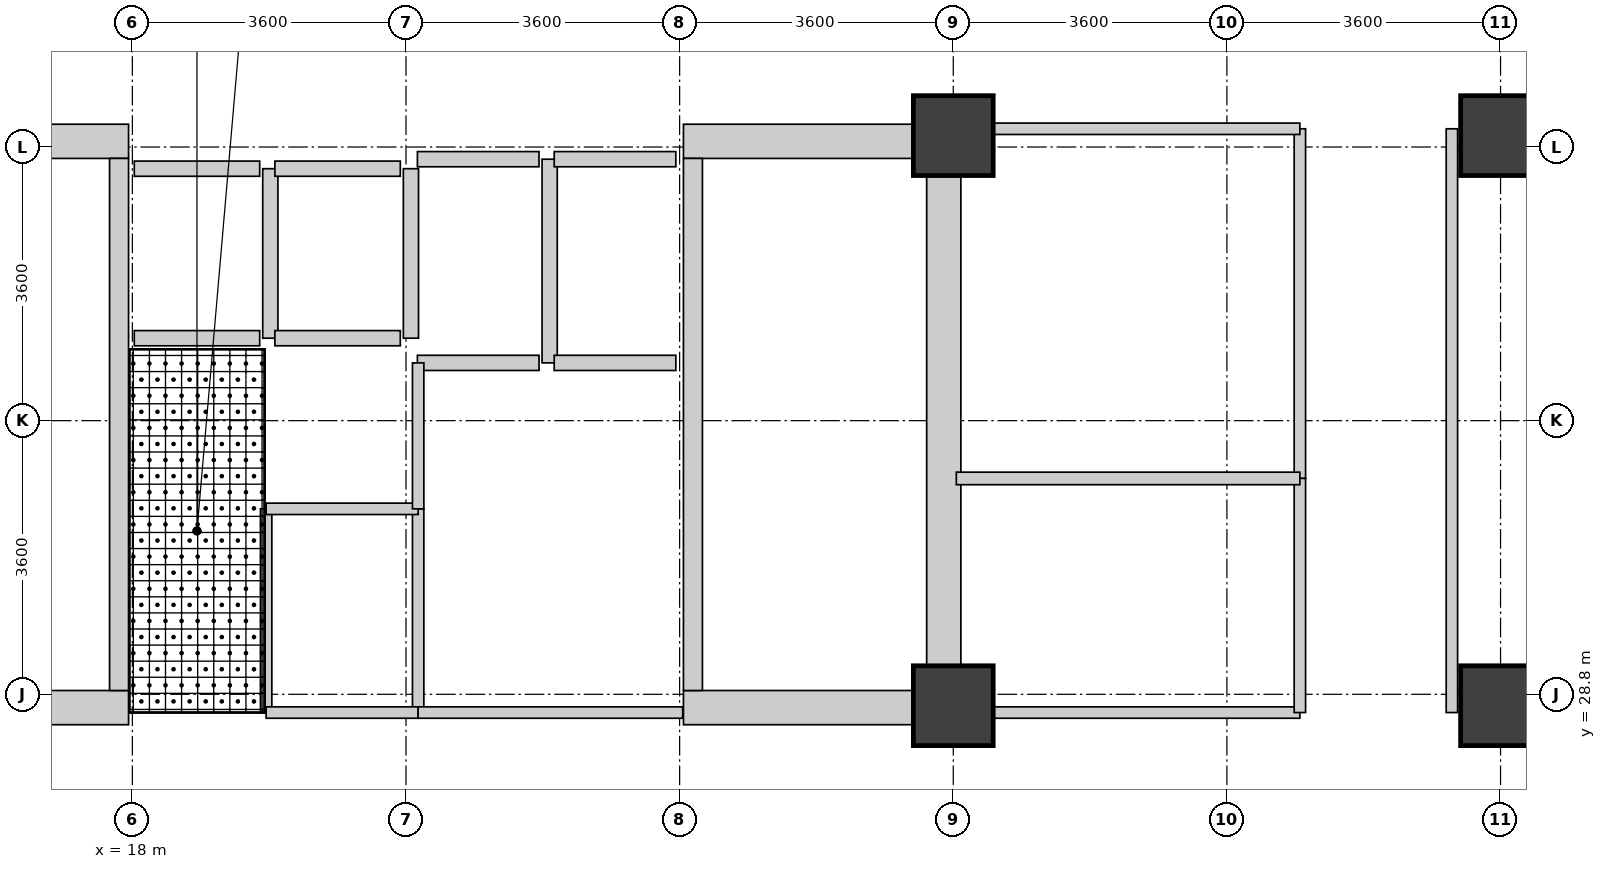
"""IFC4 building model, lengths in metres.
Left out: names, types, materials, properties, quantities, classifications, styles, units other than length and angle.
Written with IfcOpenShell. Run it as: python <this file> out.ifc"""

import sys

from ifc_helpers import new_model, si_unit, direction, frame, frame_2d, origin, origin_2d, place, context, subcontext, project, spatial, rectangle, extrude, source, transform, mapped, element, fill, save


model = new_model("IFC4")
c1 = context("Model", 3, precision=1e-05, world=origin(), true_north=direction((0.0, 1.0)))
c2 = subcontext(c1, "Body", "Model", "MODEL_VIEW")
j1 = project(units=[si_unit("LENGTHUNIT", "METRE"), si_unit("PLANEANGLEUNIT", "RADIAN")], contexts=[c1])
p1 = place(None, origin())
s1 = spatial("IfcSite", under=j1, at=p1, CompositionType="ELEMENT")
p2 = place(p1, origin())
s2 = spatial("IfcBuilding", under=s1, at=p2, CompositionType="ELEMENT")
p3 = place(p2, frame((0.0, 0.0, 135.6)))
s3 = spatial("IfcBuildingStorey", under=s2, at=p3, CompositionType="ELEMENT", Elevation=135.6)
p4 = place(p3, frame((28.675, 28.4, 0.0), z_axis=(0.0, 0.0, 1.0), x_axis=(0.0, 1.0, 0.0)))
e1 = element("IfcWall", 1, at=p4, inside=s3, PredefinedType="SHEAR", context=c2, shape_type="SweptSolid", body=[
    extrude(rectangle(XDim=7.9, YDim=0.45, at=frame_2d((3.95, 0.0))), origin(), (0.0, 0.0, 1.0), 4.36),
])
for number, where, z_axis, x_axis in (
    (2, (14.75, 28.625, 0.0), (0.0, 0.0, 1.0), (1.0, 0.0, 0.0)),
    (3, (25.25, 28.625, 0.0), (0.0, 0.0, 1.0), (1.0, 0.0, 0.0)),
    (4, (14.75, 36.075, 0.0), (0.0, 0.0, 1.0), (1.0, 0.0, 0.0)),
    (5, (25.25, 36.075, 0.0), (0.0, 0.0, 1.0), (1.0, 0.0, 0.0)),
):
    element("IfcWall", number, at=place(p3, frame(where, z_axis=z_axis, x_axis=x_axis)), inside=s3, PredefinedType="SHEAR", context=c2, shape_type="SweptSolid", body=[
        extrude(rectangle(XDim=3.2, YDim=0.45, at=frame_2d((1.6, 0.0))), origin(), (0.0, 0.0, 1.0), 4.36),
    ])
p5 = place(p3, frame((17.825, 28.85, 0.0), z_axis=(0.0, 0.0, 1.0), x_axis=(0.0, 1.0, 0.0)))
e6 = element("IfcWall", 6, at=p5, inside=s3, PredefinedType="SHEAR", context=c2, shape_type="SweptSolid", body=[
    extrude(rectangle(XDim=7.0, YDim=0.25, at=frame_2d((3.5, 0.0))), origin(), (0.0, 0.0, 1.0), 4.36),
])
p6 = place(p5, frame((0.15, 0.0, 0.0)))
e7 = element("IfcOpeningElement", 7, at=p6, cuts=e6, PredefinedType="OPENING", context=c2, shape_type="SweptSolid", body=[
    extrude(rectangle(XDim=1.1, YDim=2.08, at=frame_2d((0.55, 1.04))), frame((0.0, 0.135, 0.0), z_axis=(0.0, -1.0, 0.0), x_axis=(1.0, 0.0, 0.0)), (0.0, 0.0, 1.0), 0.27),
])
p7 = place(p3, frame((25.375, 28.85, 0.0), z_axis=(0.0, 0.0, 1.0), x_axis=(0.0, 1.0, 0.0)))
e8 = element("IfcWall", 8, at=p7, inside=s3, PredefinedType="SHEAR", context=c2, shape_type="SweptSolid", body=[
    extrude(rectangle(XDim=7.0, YDim=0.25, at=frame_2d((3.5, 0.0))), origin(), (0.0, 0.0, 1.0), 4.36),
])
p8 = place(p7, frame((0.15, 0.0, 0.0)))
e9 = element("IfcOpeningElement", 9, at=p8, cuts=e8, PredefinedType="OPENING", context=c2, shape_type="SweptSolid", body=[
    extrude(rectangle(XDim=1.1, YDim=2.08, at=frame_2d((0.55, 1.04))), frame((0.0, 0.135, 0.0), z_axis=(0.0, -1.0, 0.0), x_axis=(1.0, 0.0, 0.0)), (0.0, 0.0, 1.0), 0.27),
])
m1 = source(origin(), c2, "Body", "SweptSolid", [
    extrude(rectangle(XDim=1.05, YDim=1.05, at=origin_2d()), origin(), (0.0, 0.0, 1.0), 4.6),
])
for number, where, z_axis, x_axis in (
    (10, (28.8, 28.65, 0.0), (0.0, 0.0, 1.0), (1.0, 0.0, 0.0)),
    (11, (28.8, 36.15, 0.0), (0.0, 0.0, 1.0), (1.0, 0.0, 0.0)),
    (12, (36.0, 28.65, 0.0), (0.0, 0.0, 1.0), (1.0, 0.0, 0.0)),
    (13, (36.0, 36.15, 0.0), (0.0, 0.0, 1.0), (1.0, 0.0, 0.0)),
):
    element("IfcColumn", number, at=place(p3, frame(where, z_axis=z_axis, x_axis=x_axis)), inside=s3, PredefinedType="COLUMN", context=c2, shape_type="MappedRepresentation", body=[
        mapped(m1, transform((0.0, 0.0, 0.0), x_axis=(1.0, 0.0, 0.0), y_axis=(0.0, 1.0, 0.0), z_axis=(0.0, 0.0, 1.0), scale=1.0)),
    ])
p9 = place(p3, frame((18.025, 33.485, 0.0), z_axis=(0.0, 0.0, 1.0), x_axis=(1.0, 0.0, 0.0)))
e14 = element("IfcWall", 14, at=p9, inside=s3, PredefinedType="PARTITIONING", context=c2, shape_type="SweptSolid", body=[
    extrude(rectangle(XDim=1.65, YDim=0.2, at=frame_2d((0.825, 0.0))), origin(), (0.0, 0.0, 1.0), 4.34),
])
p10 = place(p9, frame((0.275, 0.0, 0.0)))
e15 = element("IfcOpeningElement", 15, at=p10, cuts=e14, PredefinedType="OPENING", context=c2, shape_type="SweptSolid", body=[
    extrude(rectangle(XDim=1.1, YDim=2.12, at=frame_2d((0.55, 1.06))), frame((0.0, 0.11, 0.0), z_axis=(0.0, -1.0, 0.0), x_axis=(1.0, 0.0, 0.0)), (0.0, 0.0, 1.0), 0.22),
])
p11 = place(p3, frame((18.025, 35.715, 0.0), z_axis=(0.0, 0.0, 1.0), x_axis=(1.0, 0.0, 0.0)))
e16 = element("IfcWall", 16, at=p11, inside=s3, PredefinedType="PARTITIONING", context=c2, shape_type="SweptSolid", body=[
    extrude(rectangle(XDim=1.65, YDim=0.2, at=frame_2d((0.825, 0.0))), origin(), (0.0, 0.0, 1.0), 3.34),
])
p12 = place(p3, frame((19.815, 33.485, 0.0), z_axis=(0.0, 0.0, 1.0), x_axis=(0.0, 1.0, 0.0)))
e17 = element("IfcWall", 17, at=p12, inside=s3, PredefinedType="PARTITIONING", context=c2, shape_type="SweptSolid", body=[
    extrude(rectangle(XDim=2.23, YDim=0.2, at=frame_2d((1.115, 0.0))), origin(), (0.0, 0.0, 1.0), 4.34),
])
p13 = place(p3, frame((19.875, 33.485, 0.0), z_axis=(0.0, 0.0, 1.0), x_axis=(1.0, 0.0, 0.0)))
e18 = element("IfcWall", 18, at=p13, inside=s3, PredefinedType="PARTITIONING", context=c2, shape_type="SweptSolid", body=[
    extrude(rectangle(XDim=1.65, YDim=0.2, at=frame_2d((0.825, 0.0))), origin(), (0.0, 0.0, 1.0), 4.34),
])
p14 = place(p13, frame((0.275, 0.0, 0.0)))
e19 = element("IfcOpeningElement", 19, at=p14, cuts=e18, PredefinedType="OPENING", context=c2, shape_type="SweptSolid", body=[
    extrude(rectangle(XDim=1.1, YDim=2.12, at=frame_2d((0.55, 1.06))), frame((0.0, 0.11, 0.0), z_axis=(0.0, -1.0, 0.0), x_axis=(1.0, 0.0, 0.0)), (0.0, 0.0, 1.0), 0.22),
])
p15 = place(p3, frame((19.875, 35.715, 0.0), z_axis=(0.0, 0.0, 1.0), x_axis=(1.0, 0.0, 0.0)))
e20 = element("IfcWall", 20, at=p15, inside=s3, PredefinedType="PARTITIONING", context=c2, shape_type="SweptSolid", body=[
    extrude(rectangle(XDim=1.65, YDim=0.2, at=frame_2d((0.825, 0.0))), origin(), (0.0, 0.0, 1.0), 3.34),
])
p16 = place(p3, frame((21.665, 33.485, 0.0), z_axis=(0.0, 0.0, 1.0), x_axis=(0.0, 1.0, 0.0)))
e21 = element("IfcWall", 21, at=p16, inside=s3, PredefinedType="PARTITIONING", context=c2, shape_type="SweptSolid", body=[
    extrude(rectangle(XDim=2.23, YDim=0.2, at=frame_2d((1.115, 0.0))), origin(), (0.0, 0.0, 1.0), 4.34),
])
p17 = place(p3, frame((21.75, 33.16, 0.0), z_axis=(0.0, 0.0, 1.0), x_axis=(1.0, 0.0, 0.0)))
e22 = element("IfcWall", 22, at=p17, inside=s3, PredefinedType="PARTITIONING", context=c2, shape_type="SweptSolid", body=[
    extrude(rectangle(XDim=1.6, YDim=0.2, at=frame_2d((0.8, 0.0))), origin(), (0.0, 0.0, 1.0), 4.34),
])
p18 = place(p17, frame((0.2, 0.0, 0.0)))
e23 = element("IfcOpeningElement", 23, at=p18, cuts=e22, PredefinedType="OPENING", context=c2, shape_type="SweptSolid", body=[
    extrude(rectangle(XDim=1.2, YDim=2.12, at=frame_2d((0.6, 1.06))), frame((0.0, 0.11, 0.0), z_axis=(0.0, -1.0, 0.0), x_axis=(1.0, 0.0, 0.0)), (0.0, 0.0, 1.0), 0.22),
])
p19 = place(p3, frame((21.75, 35.84, 0.0), z_axis=(0.0, 0.0, 1.0), x_axis=(1.0, 0.0, 0.0)))
e24 = element("IfcWall", 24, at=p19, inside=s3, PredefinedType="PARTITIONING", context=c2, shape_type="SweptSolid", body=[
    extrude(rectangle(XDim=1.6, YDim=0.2, at=frame_2d((0.8, 0.0))), origin(), (0.0, 0.0, 1.0), 3.34),
])
p20 = place(p3, frame((23.49, 33.16, 0.0), z_axis=(0.0, 0.0, 1.0), x_axis=(0.0, 1.0, 0.0)))
e25 = element("IfcWall", 25, at=p20, inside=s3, PredefinedType="PARTITIONING", context=c2, shape_type="SweptSolid", body=[
    extrude(rectangle(XDim=2.68, YDim=0.2, at=frame_2d((1.34, 0.0))), origin(), (0.0, 0.0, 1.0), 4.34),
])
p21 = place(p3, frame((23.55, 33.16, 0.0), z_axis=(0.0, 0.0, 1.0), x_axis=(1.0, 0.0, 0.0)))
e26 = element("IfcWall", 26, at=p21, inside=s3, PredefinedType="PARTITIONING", context=c2, shape_type="SweptSolid", body=[
    extrude(rectangle(XDim=1.6, YDim=0.2, at=frame_2d((0.8, 0.0))), origin(), (0.0, 0.0, 1.0), 4.34),
])
p22 = place(p21, frame((0.2, 0.0, 0.0)))
e27 = element("IfcOpeningElement", 27, at=p22, cuts=e26, PredefinedType="OPENING", context=c2, shape_type="SweptSolid", body=[
    extrude(rectangle(XDim=1.2, YDim=2.12, at=frame_2d((0.6, 1.06))), frame((0.0, 0.11, 0.0), z_axis=(0.0, -1.0, 0.0), x_axis=(1.0, 0.0, 0.0)), (0.0, 0.0, 1.0), 0.22),
])
p23 = place(p3, frame((23.55, 35.84, 0.0), z_axis=(0.0, 0.0, 1.0), x_axis=(1.0, 0.0, 0.0)))
e28 = element("IfcWall", 28, at=p23, inside=s3, PredefinedType="PARTITIONING", context=c2, shape_type="SweptSolid", body=[
    extrude(rectangle(XDim=1.6, YDim=0.2, at=frame_2d((0.8, 0.0))), origin(), (0.0, 0.0, 1.0), 3.34),
])
p24 = place(p3, frame((35.36, 28.56, 0.0), z_axis=(0.0, 0.0, 1.0), x_axis=(0.0, 1.0, 0.0)))
e29 = element("IfcWall", 29, at=p24, inside=s3, PredefinedType="PARTITIONING", context=c2, shape_type="SweptSolid", body=[
    extrude(rectangle(XDim=7.68, YDim=0.15, at=frame_2d((3.84, 0.0))), origin(), (0.0, 0.0, 1.0), 4.34),
])
p25 = place(p24, frame((3.19, 0.0, 0.0)))
e30 = element("IfcOpeningElement", 30, at=p25, cuts=e29, PredefinedType="OPENING", context=c2, shape_type="SweptSolid", body=[
    extrude(rectangle(XDim=1.3, YDim=2.12, at=frame_2d((0.65, 1.06))), frame((0.0, 0.085, 0.0), z_axis=(0.0, -1.0, 0.0), x_axis=(1.0, 0.0, 0.0)), (0.0, 0.0, 1.0), 0.17),
])
p26 = place(p3, frame((33.36, 31.64, 0.0), z_axis=(0.0, 0.0, 1.0), x_axis=(0.0, 1.0, 0.0)))
e31 = element("IfcWall", 31, at=p26, inside=s3, PredefinedType="PARTITIONING", context=c2, shape_type="SweptSolid", body=[
    extrude(rectangle(XDim=4.6, YDim=0.15, at=frame_2d((2.3, 0.0))), origin(), (0.0, 0.0, 1.0), 4.34),
])
p27 = place(p26, frame((1.65, 0.0, 0.0)))
e32 = element("IfcOpeningElement", 32, at=p27, cuts=e31, PredefinedType="OPENING", context=c2, shape_type="SweptSolid", body=[
    extrude(rectangle(XDim=1.3, YDim=2.12, at=frame_2d((0.65, 1.06))), frame((0.0, 0.085, 0.0), z_axis=(0.0, -1.0, 0.0), x_axis=(1.0, 0.0, 0.0)), (0.0, 0.0, 1.0), 0.17),
])
p28 = place(p3, frame((29.325, 28.56, 0.0), z_axis=(0.0, 0.0, 1.0), x_axis=(1.0, 0.0, 0.0)))
e33 = element("IfcWall", 33, at=p28, inside=s3, PredefinedType="PARTITIONING", context=c2, shape_type="SweptSolid", body=[
    extrude(rectangle(XDim=4.035, YDim=0.15, at=frame_2d((2.018, 0.0))), origin(), (0.0, 0.0, 1.0), 3.74),
])
p29 = place(p28, frame((1.587, 0.0, 0.0)))
e34 = element("IfcOpeningElement", 34, at=p29, cuts=e33, PredefinedType="OPENING", context=c2, shape_type="SweptSolid", body=[
    extrude(rectangle(XDim=0.86, YDim=2.02, at=frame_2d((0.43, 1.01))), frame((0.0, 0.085, 0.0), z_axis=(0.0, -1.0, 0.0), x_axis=(1.0, 0.0, 0.0)), (0.0, 0.0, 1.0), 0.17),
])
p30 = place(p3, frame((29.325, 36.24, 0.0), z_axis=(0.0, 0.0, 1.0), x_axis=(1.0, 0.0, 0.0)))
e35 = element("IfcWall", 35, at=p30, inside=s3, PredefinedType="PARTITIONING", context=c2, shape_type="SweptSolid", body=[
    extrude(rectangle(XDim=4.035, YDim=0.15, at=frame_2d((2.018, 0.0))), origin(), (0.0, 0.0, 1.0), 3.74),
])
p31 = place(p3, frame((33.36, 28.56, 0.0), z_axis=(0.0, 0.0, 1.0), x_axis=(0.0, 1.0, 0.0)))
e36 = element("IfcWall", 36, at=p31, inside=s3, PredefinedType="PARTITIONING", context=c2, shape_type="SweptSolid", body=[
    extrude(rectangle(XDim=3.08, YDim=0.15, at=frame_2d((1.54, 0.0))), origin(), (0.0, 0.0, 1.0), 4.34),
])
p32 = place(p3, frame((19.76, 28.56, 0.0), z_axis=(0.0, 0.0, 1.0), x_axis=(0.0, 1.0, 0.0)))
e37 = element("IfcWall", 37, at=p32, inside=s3, PredefinedType="PARTITIONING", context=c2, shape_type="SweptSolid", body=[
    extrude(rectangle(XDim=2.68, YDim=0.15, at=frame_2d((1.34, 0.0))), origin(), (0.0, 0.0, 1.0), 4.34),
])
p33 = place(p32, frame((0.91, 0.0, 0.0)))
e38 = element("IfcOpeningElement", 38, at=p33, cuts=e37, PredefinedType="OPENING", context=c2, shape_type="SweptSolid", body=[
    extrude(rectangle(XDim=0.86, YDim=2.02, at=frame_2d((0.43, 1.01))), frame((0.0, 0.085, 0.0), z_axis=(0.0, -1.0, 0.0), x_axis=(1.0, 0.0, 0.0)), (0.0, 0.0, 1.0), 0.17),
])
p34 = place(p3, frame((21.76, 28.56, 0.0), z_axis=(0.0, 0.0, 1.0), x_axis=(0.0, 1.0, 0.0)))
e39 = element("IfcWall", 39, at=p34, inside=s3, PredefinedType="PARTITIONING", context=c2, shape_type="SweptSolid", body=[
    extrude(rectangle(XDim=2.68, YDim=0.15, at=frame_2d((1.34, 0.0))), origin(), (0.0, 0.0, 1.0), 4.34),
])
p35 = place(p3, frame((19.76, 28.56, 0.0), z_axis=(0.0, 0.0, 1.0), x_axis=(1.0, 0.0, 0.0)))
e40 = element("IfcWall", 40, at=p35, inside=s3, PredefinedType="PARTITIONING", context=c2, shape_type="SweptSolid", body=[
    extrude(rectangle(XDim=2.0, YDim=0.15, at=frame_2d((1.0, 0.0))), origin(), (0.0, 0.0, 1.0), 3.34),
])
p36 = place(p3, frame((19.76, 31.24, 0.0), z_axis=(0.0, 0.0, 1.0), x_axis=(1.0, 0.0, 0.0)))
e41 = element("IfcWall", 41, at=p36, inside=s3, PredefinedType="PARTITIONING", context=c2, shape_type="SweptSolid", body=[
    extrude(rectangle(XDim=2.0, YDim=0.15, at=frame_2d((1.0, 0.0))), origin(), (0.0, 0.0, 1.0), 4.34),
])
p37 = place(p3, frame((28.84, 31.64, 0.0), z_axis=(0.0, 0.0, 1.0), x_axis=(1.0, 0.0, 0.0)))
e42 = element("IfcWall", 42, at=p37, inside=s3, PredefinedType="PARTITIONING", context=c2, shape_type="SweptSolid", body=[
    extrude(rectangle(XDim=4.52, YDim=0.165, at=frame_2d((2.26, 0.0))), origin(), (0.0, 0.0, 1.0), 4.34),
])
p38 = place(p3, frame((21.76, 28.56, 0.0), z_axis=(0.0, 0.0, 1.0), x_axis=(1.0, 0.0, 0.0)))
e43 = element("IfcWall", 43, at=p38, inside=s3, PredefinedType="PARTITIONING", context=c2, shape_type="SweptSolid", body=[
    extrude(rectangle(XDim=3.48, YDim=0.15, at=frame_2d((1.74, 0.0))), origin(), (0.0, 0.0, 1.0), 3.34),
])
p39 = place(p38, frame((0.99, 0.0, 0.0)))
e44 = element("IfcOpeningElement", 44, at=p39, cuts=e43, PredefinedType="OPENING", context=c2, shape_type="SweptSolid", body=[
    extrude(rectangle(XDim=1.5, YDim=2.1, at=frame_2d((0.75, 1.05))), frame((0.0, 0.085, 0.0), z_axis=(0.0, -1.0, 0.0), x_axis=(1.0, 0.0, 0.0)), (0.0, 0.0, 1.0), 0.17),
])
p40 = place(p3, frame((21.76, 31.24, 0.0), z_axis=(0.0, 0.0, 1.0), x_axis=(0.0, 1.0, 0.0)))
e45 = element("IfcWall", 45, at=p40, inside=s3, PredefinedType="PARTITIONING", context=c2, shape_type="SweptSolid", body=[
    extrude(rectangle(XDim=1.92, YDim=0.15, at=frame_2d((0.96, 0.0))), origin(), (0.0, 0.0, 1.0), 4.34),
])
p41 = place(p6, origin())
e46 = element("IfcDoor", 46, at=p41, inside=s3, OperationType="SINGLE_SWING_RIGHT", PredefinedType="DOOR", context=c2, shape_type="SweptSolid", body=[
    extrude(rectangle(XDim=1.1, YDim=2.08, at=frame_2d((0.55, 1.04))), frame((0.0, 0.025, 0.0), z_axis=(0.0, -1.0, 0.0), x_axis=(1.0, 0.0, 0.0)), (0.0, 0.0, 1.0), 0.05),
])
fill(e7, e46)
p42 = place(p8, origin())
e47 = element("IfcDoor", 47, at=p42, inside=s3, OperationType="SINGLE_SWING_LEFT", PredefinedType="DOOR", context=c2, shape_type="SweptSolid", body=[
    extrude(rectangle(XDim=1.1, YDim=2.08, at=frame_2d((0.55, 1.04))), frame((0.0, 0.025, 0.0), z_axis=(0.0, -1.0, 0.0), x_axis=(1.0, 0.0, 0.0)), (0.0, 0.0, 1.0), 0.05),
])
fill(e9, e47)
p43 = place(p10, origin())
e48 = element("IfcDoor", 48, at=p43, inside=s3, OperationType="SLIDING_TO_LEFT", PredefinedType="DOOR", context=c2, shape_type="SweptSolid", body=[
    extrude(rectangle(XDim=1.1, YDim=2.12, at=frame_2d((0.55, 1.06))), frame((0.0, 0.025, 0.0), z_axis=(0.0, -1.0, 0.0), x_axis=(1.0, 0.0, 0.0)), (0.0, 0.0, 1.0), 0.05),
])
fill(e15, e48)
p44 = place(p14, origin())
e49 = element("IfcDoor", 49, at=p44, inside=s3, OperationType="SLIDING_TO_LEFT", PredefinedType="DOOR", context=c2, shape_type="SweptSolid", body=[
    extrude(rectangle(XDim=1.1, YDim=2.12, at=frame_2d((0.55, 1.06))), frame((0.0, 0.025, 0.0), z_axis=(0.0, -1.0, 0.0), x_axis=(1.0, 0.0, 0.0)), (0.0, 0.0, 1.0), 0.05),
])
fill(e19, e49)
p45 = place(p18, origin())
e50 = element("IfcDoor", 50, at=p45, inside=s3, OperationType="SLIDING_TO_RIGHT", PredefinedType="DOOR", context=c2, shape_type="SweptSolid", body=[
    extrude(rectangle(XDim=1.2, YDim=2.12, at=frame_2d((0.6, 1.06))), frame((0.0, 0.025, 0.0), z_axis=(0.0, -1.0, 0.0), x_axis=(1.0, 0.0, 0.0)), (0.0, 0.0, 1.0), 0.05),
])
fill(e23, e50)
p46 = place(p22, origin())
e51 = element("IfcDoor", 51, at=p46, inside=s3, OperationType="SLIDING_TO_RIGHT", PredefinedType="DOOR", context=c2, shape_type="SweptSolid", body=[
    extrude(rectangle(XDim=1.2, YDim=2.12, at=frame_2d((0.6, 1.06))), frame((0.0, 0.025, 0.0), z_axis=(0.0, -1.0, 0.0), x_axis=(1.0, 0.0, 0.0)), (0.0, 0.0, 1.0), 0.05),
])
fill(e27, e51)
p47 = place(p25, origin())
e52 = element("IfcDoor", 52, at=p47, inside=s3, OperationType="DOUBLE_DOOR_SINGLE_SWING", PredefinedType="DOOR", context=c2, shape_type="SweptSolid", body=[
    extrude(rectangle(XDim=1.3, YDim=2.12, at=frame_2d((0.65, 1.06))), frame((0.0, 0.025, 0.0), z_axis=(0.0, -1.0, 0.0), x_axis=(1.0, 0.0, 0.0)), (0.0, 0.0, 1.0), 0.05),
])
fill(e30, e52)
p48 = place(p27, origin())
e53 = element("IfcDoor", 53, at=p48, inside=s3, OperationType="DOUBLE_DOOR_SINGLE_SWING", PredefinedType="DOOR", context=c2, shape_type="SweptSolid", body=[
    extrude(rectangle(XDim=1.3, YDim=2.12, at=frame_2d((0.65, 1.06))), frame((0.0, 0.025, 0.0), z_axis=(0.0, -1.0, 0.0), x_axis=(1.0, 0.0, 0.0)), (0.0, 0.0, 1.0), 0.05),
])
fill(e32, e53)
p49 = place(p29, origin())
e54 = element("IfcDoor", 54, at=p49, inside=s3, OperationType="SINGLE_SWING_RIGHT", PredefinedType="DOOR", context=c2, shape_type="SweptSolid", body=[
    extrude(rectangle(XDim=0.86, YDim=2.02, at=frame_2d((0.43, 1.01))), frame((0.0, 0.025, 0.0), z_axis=(0.0, -1.0, 0.0), x_axis=(1.0, 0.0, 0.0)), (0.0, 0.0, 1.0), 0.05),
])
fill(e34, e54)
p50 = place(p33, origin())
e55 = element("IfcDoor", 55, at=p50, inside=s3, OperationType="SINGLE_SWING_LEFT", PredefinedType="DOOR", context=c2, shape_type="SweptSolid", body=[
    extrude(rectangle(XDim=0.86, YDim=2.02, at=frame_2d((0.43, 1.01))), frame((0.0, 0.025, 0.0), z_axis=(0.0, -1.0, 0.0), x_axis=(1.0, 0.0, 0.0)), (0.0, 0.0, 1.0), 0.05),
])
fill(e38, e55)
p51 = place(p39, origin())
e56 = element("IfcDoor", 56, at=p51, inside=s3, OperationType="DOUBLE_DOOR_SINGLE_SWING", PredefinedType="DOOR", context=c2, shape_type="SweptSolid", body=[
    extrude(rectangle(XDim=1.5, YDim=2.1, at=frame_2d((0.75, 1.05))), frame((0.0, 0.025, 0.0), z_axis=(0.0, -1.0, 0.0), x_axis=(1.0, 0.0, 0.0)), (0.0, 0.0, 1.0), 0.05),
])
fill(e44, e56)
save(model, sys.argv[1])
